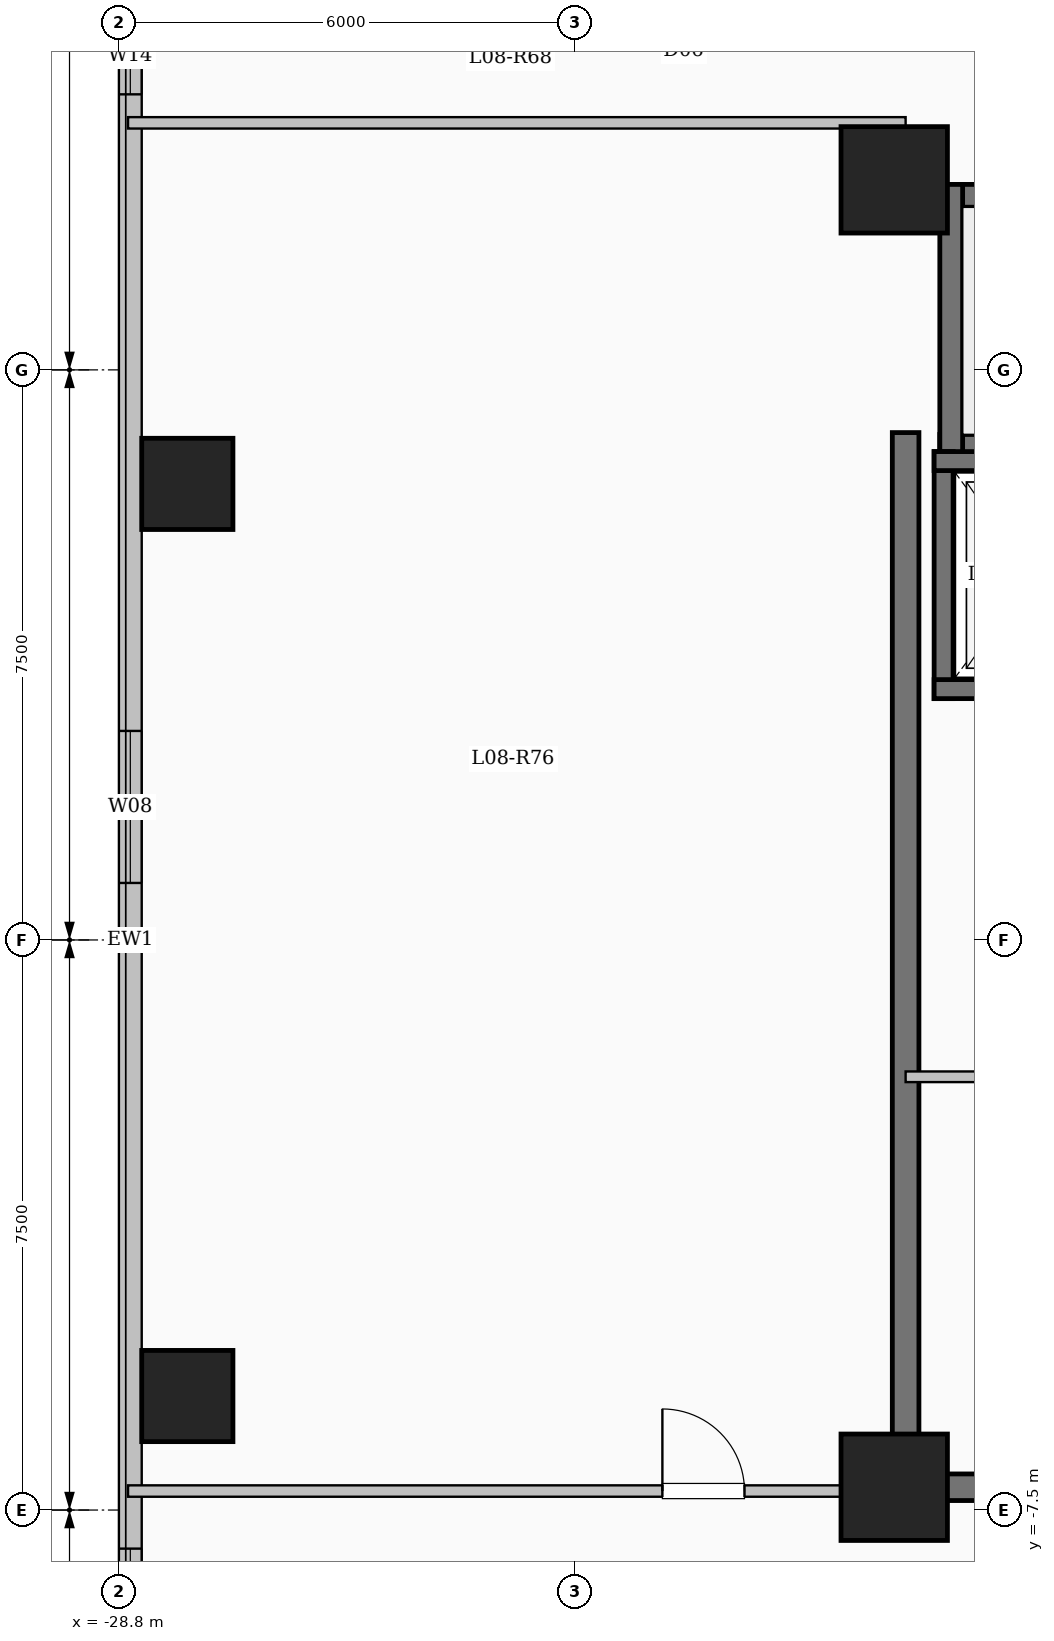
"""IFC4 building model, lengths in metres.
Left out: names, types, materials, properties, quantities, classifications, styles, units other than length and angle.
Written with IfcOpenShell. Run it as: python <this file> out.ifc"""

import sys

from ifc_helpers import new_model, si_unit, direction, frame, frame_2d, origin, origin_2d, place, context, subcontext, project, spatial, rectangle, extrude, element, fill, save


model = new_model("IFC4")
c1 = context("Model", 3, precision=1e-05, world=origin(), true_north=direction((0.0, 1.0)))
c2 = subcontext(c1, "Body", "Model", "MODEL_VIEW")
j1 = project(units=[si_unit("LENGTHUNIT", "METRE"), si_unit("PLANEANGLEUNIT", "RADIAN")], contexts=[c1])
p1 = place(None, origin())
s1 = spatial("IfcSite", under=j1, at=p1, CompositionType="ELEMENT")
p2 = place(p1, origin())
s2 = spatial("IfcBuilding", under=s1, at=p2, CompositionType="ELEMENT")
p3 = place(p2, frame((0.0, 0.0, 34.05)))
s3 = spatial("IfcBuildingStorey", under=s2, at=p3, CompositionType="ELEMENT", Elevation=34.05)
for number, where, z_axis, x_axis in (
    (1, (-18.6, -7.2, 0.0), (0.0, 0.0, 1.0), (1.0, 0.0, 0.0)),
    (2, (-18.6, 10.0, 0.0), (0.0, 0.0, 1.0), (1.0, 0.0, 0.0)),
):
    element("IfcColumn", number, at=place(p3, frame(where, z_axis=z_axis, x_axis=x_axis)), inside=s3, PredefinedType="COLUMN", context=c2, shape_type="SweptSolid", body=[
        extrude(rectangle(XDim=1.4, YDim=1.4, at=origin_2d()), origin(), (0.0, 0.0, 1.0), 3.35),
    ])
for number, where, z_axis, x_axis in (
    (3, (-27.9, -6.0, 0.0), (0.0, 0.0, 1.0), (1.0, 0.0, 0.0)),
    (4, (-27.9, 6.0, 0.0), (0.0, 0.0, 1.0), (1.0, 0.0, 0.0)),
):
    element("IfcColumn", number, at=place(p3, frame(where, z_axis=z_axis, x_axis=x_axis)), inside=s3, PredefinedType="COLUMN", context=c2, shape_type="SweptSolid", body=[
        extrude(rectangle(XDim=1.2, YDim=1.2, at=origin_2d()), origin(), (0.0, 0.0, 1.0), 3.35),
    ])
p4 = place(p3, frame((-28.65, -19.05, 0.0), z_axis=(0.0, 0.0, 1.0), x_axis=(0.0, 1.0, 0.0)))
e5 = element("IfcWall", 5, at=p4, inside=s3, PredefinedType="SOLIDWALL", context=c2, shape_type="SweptSolid", body=[
    extrude(rectangle(XDim=38.1, YDim=0.3, at=frame_2d((19.05, 0.0))), origin(), (0.0, 0.0, 1.0), 3.1),
])
p5 = place(p4, frame((3.15, 0.0, 0.9)))
e6 = element("IfcOpeningElement", 6, at=p5, cuts=e5, PredefinedType="OPENING", context=c2, shape_type="SweptSolid", body=[
    extrude(rectangle(XDim=2.4, YDim=1.8, at=frame_2d((1.2, 0.9))), frame((0.0, 0.16, 0.0), z_axis=(0.0, -1.0, 0.0), x_axis=(1.0, 0.0, 0.0)), (0.0, 0.0, 1.0), 0.32),
])
p6 = place(p4, frame((9.542, 0.0, 0.9)))
e7 = element("IfcOpeningElement", 7, at=p6, cuts=e5, PredefinedType="OPENING", context=c2, shape_type="SweptSolid", body=[
    extrude(rectangle(XDim=1.5, YDim=1.65, at=frame_2d((0.75, 0.825))), frame((0.0, 0.16, 0.0), z_axis=(0.0, -1.0, 0.0), x_axis=(1.0, 0.0, 0.0)), (0.0, 0.0, 1.0), 0.32),
])
p7 = place(p4, frame((19.8, 0.0, 0.9)))
e8 = element("IfcOpeningElement", 8, at=p7, cuts=e5, PredefinedType="OPENING", context=c2, shape_type="SweptSolid", body=[
    extrude(rectangle(XDim=2.0, YDim=1.7, at=frame_2d((1.0, 0.85))), frame((0.0, 0.16, 0.0), z_axis=(0.0, -1.0, 0.0), x_axis=(1.0, 0.0, 0.0)), (0.0, 0.0, 1.0), 0.32),
])
p8 = place(p4, frame((30.175, 0.0, 0.95)))
e9 = element("IfcOpeningElement", 9, at=p8, cuts=e5, PredefinedType="OPENING", context=c2, shape_type="SweptSolid", body=[
    extrude(rectangle(XDim=1.0, YDim=1.5, at=frame_2d((0.5, 0.75))), frame((0.0, 0.16, 0.0), z_axis=(0.0, -1.0, 0.0), x_axis=(1.0, 0.0, 0.0)), (0.0, 0.0, 1.0), 0.32),
])
p9 = place(p4, frame((33.85, 0.0, 0.9)))
e10 = element("IfcOpeningElement", 10, at=p9, cuts=e5, PredefinedType="OPENING", context=c2, shape_type="SweptSolid", body=[
    extrude(rectangle(XDim=2.0, YDim=1.7, at=frame_2d((1.0, 0.85))), frame((0.0, 0.16, 0.0), z_axis=(0.0, -1.0, 0.0), x_axis=(1.0, 0.0, 0.0)), (0.0, 0.0, 1.0), 0.32),
])
p10 = place(p3, frame((-18.0, 9.79, 0.0), z_axis=(0.0, 0.0, 1.0), x_axis=(1.0, 0.0, 0.0)))
e11 = element("IfcWall", 11, at=p10, inside=s3, PredefinedType="SHEAR", context=c2, shape_type="SweptSolid", body=[
    extrude(rectangle(XDim=8.0, YDim=0.3, at=frame_2d((4.0, 0.0))), origin(), (0.0, 0.0, 1.0), 3.35),
])
p11 = place(p3, frame((-18.0, 6.5, 0.0), z_axis=(0.0, 0.0, 1.0), x_axis=(1.0, 0.0, 0.0)))
e12 = element("IfcWall", 12, at=p11, inside=s3, PredefinedType="SHEAR", context=c2, shape_type="SweptSolid", body=[
    extrude(rectangle(XDim=8.0, YDim=0.3, at=frame_2d((4.0, 0.0))), origin(), (0.0, 0.0, 1.0), 3.35),
])
p12 = place(p11, frame((6.45, 0.0, 0.0)))
e13 = element("IfcOpeningElement", 13, at=p12, cuts=e12, PredefinedType="OPENING", context=c2, shape_type="SweptSolid", body=[
    extrude(rectangle(XDim=1.0, YDim=2.15, at=frame_2d((0.5, 1.075))), frame((0.0, 0.16, 0.0), z_axis=(0.0, -1.0, 0.0), x_axis=(1.0, 0.0, 0.0)), (0.0, 0.0, 1.0), 0.32),
])
p13 = place(p3, frame((-17.85, 6.35, 0.0), z_axis=(0.0, 0.0, 1.0), x_axis=(0.0, 1.0, 0.0)))
e14 = element("IfcWall", 14, at=p13, inside=s3, PredefinedType="SHEAR", context=c2, shape_type="SweptSolid", body=[
    extrude(rectangle(XDim=3.59, YDim=0.3, at=frame_2d((1.795, 0.0))), origin(), (0.0, 0.0, 1.0), 3.35),
])
p14 = place(p3, frame((-17.95, 3.175, 0.0), z_axis=(0.0, 0.0, 1.0), x_axis=(0.0, 1.0, 0.0)))
e15 = element("IfcWall", 15, at=p14, inside=s3, PredefinedType="SHEAR", context=c2, shape_type="SweptSolid", body=[
    extrude(rectangle(XDim=3.25, YDim=0.25, at=frame_2d((1.625, 0.0))), origin(), (0.0, 0.0, 1.0), 3.35),
])
for number, where, z_axis, x_axis in (
    (16, (-18.075, 3.3, 0.0), (0.0, 0.0, 1.0), (1.0, 0.0, 0.0)),
    (17, (-18.075, 6.3, 0.0), (0.0, 0.0, 1.0), (1.0, 0.0, 0.0)),
):
    element("IfcWall", number, at=place(p3, frame(where, z_axis=z_axis, x_axis=x_axis)), inside=s3, PredefinedType="SHEAR", context=c2, shape_type="SweptSolid", body=[
        extrude(rectangle(XDim=2.55, YDim=0.25, at=frame_2d((1.275, 0.0))), origin(), (0.0, 0.0, 1.0), 3.35),
    ])
p15 = place(p3, frame((-18.45, -7.375, 0.0), z_axis=(0.0, 0.0, 1.0), x_axis=(0.0, 1.0, 0.0)))
e18 = element("IfcWall", 18, at=p15, inside=s3, PredefinedType="SHEAR", context=c2, shape_type="SweptSolid", body=[
    extrude(rectangle(XDim=14.05, YDim=0.35, at=frame_2d((7.025, 0.0))), origin(), (0.0, 0.0, 1.0), 3.35),
])
p16 = place(p3, frame((-18.625, -7.2, 0.0), z_axis=(0.0, 0.0, 1.0), x_axis=(1.0, 0.0, 0.0)))
e19 = element("IfcWall", 19, at=p16, inside=s3, PredefinedType="SHEAR", context=c2, shape_type="SweptSolid", body=[
    extrude(rectangle(XDim=8.55, YDim=0.35, at=frame_2d((4.275, 0.0))), origin(), (0.0, 0.0, 1.0), 3.35),
])
p17 = place(p3, frame((-18.45, -1.8, 0.0), z_axis=(0.0, 0.0, 1.0), x_axis=(1.0, 0.0, 0.0)))
e20 = element("IfcWall", 20, at=p17, inside=s3, PredefinedType="PARTITIONING", context=c2, shape_type="SweptSolid", body=[
    extrude(rectangle(XDim=3.05, YDim=0.14, at=frame_2d((1.525, 0.0))), origin(), (0.0, 0.0, 1.0), 3.1),
])
p18 = place(p17, frame((1.05, 0.0, 0.0)))
e21 = element("IfcOpeningElement", 21, at=p18, cuts=e20, PredefinedType="OPENING", context=c2, shape_type="SweptSolid", body=[
    extrude(rectangle(XDim=0.9, YDim=2.08, at=frame_2d((0.45, 1.04))), frame((0.0, 0.08, 0.0), z_axis=(0.0, -1.0, 0.0), x_axis=(1.0, 0.0, 0.0)), (0.0, 0.0, 1.0), 0.16),
])
p19 = place(p3, frame((-28.68, -7.25, 0.0), z_axis=(0.0, 0.0, 1.0), x_axis=(1.0, 0.0, 0.0)))
e22 = element("IfcWall", 22, at=p19, inside=s3, PredefinedType="PARTITIONING", context=c2, shape_type="SweptSolid", body=[
    extrude(rectangle(XDim=10.23, YDim=0.15, at=frame_2d((5.115, 0.0))), origin(), (0.0, 0.0, 1.0), 3.1),
])
p20 = place(p19, frame((7.03, 0.0, 0.0)))
e23 = element("IfcOpeningElement", 23, at=p20, cuts=e22, PredefinedType="OPENING", context=c2, shape_type="SweptSolid", body=[
    extrude(rectangle(XDim=1.08, YDim=2.15, at=frame_2d((0.54, 1.075))), frame((0.0, 0.085, 0.0), z_axis=(0.0, -1.0, 0.0), x_axis=(1.0, 0.0, 0.0)), (0.0, 0.0, 1.0), 0.17),
])
p21 = place(p3, frame((-28.68, 10.75, 0.0), z_axis=(0.0, 0.0, 1.0), x_axis=(1.0, 0.0, 0.0)))
e24 = element("IfcWall", 24, at=p21, inside=s3, PredefinedType="PARTITIONING", context=c2, shape_type="SweptSolid", body=[
    extrude(rectangle(XDim=10.23, YDim=0.15, at=frame_2d((5.115, 0.0))), origin(), (0.0, 0.0, 1.0), 3.1),
])
p22 = place(p6, origin())
e25 = element("IfcWindow", 25, at=p22, inside=s3, PartitioningType="SINGLE_PANEL", PredefinedType="WINDOW", context=c2, shape_type="SweptSolid", body=[
    extrude(rectangle(XDim=1.5, YDim=1.65, at=frame_2d((0.75, 0.825))), frame((0.0, 0.03, 0.0), z_axis=(0.0, -1.0, 0.0), x_axis=(1.0, 0.0, 0.0)), (0.0, 0.0, 1.0), 0.06),
])
fill(e7, e25)
p23 = place(p7, origin())
e26 = element("IfcWindow", 26, at=p23, inside=s3, PartitioningType="SINGLE_PANEL", PredefinedType="WINDOW", context=c2, shape_type="SweptSolid", body=[
    extrude(rectangle(XDim=2.0, YDim=1.7, at=frame_2d((1.0, 0.85))), frame((0.0, 0.03, 0.0), z_axis=(0.0, -1.0, 0.0), x_axis=(1.0, 0.0, 0.0)), (0.0, 0.0, 1.0), 0.06),
])
fill(e8, e26)
p24 = place(p8, origin())
e27 = element("IfcWindow", 27, at=p24, inside=s3, PartitioningType="SINGLE_PANEL", PredefinedType="WINDOW", context=c2, shape_type="SweptSolid", body=[
    extrude(rectangle(XDim=1.0, YDim=1.5, at=frame_2d((0.5, 0.75))), frame((0.0, 0.03, 0.0), z_axis=(0.0, -1.0, 0.0), x_axis=(1.0, 0.0, 0.0)), (0.0, 0.0, 1.0), 0.06),
])
fill(e9, e27)
p25 = place(p20, origin())
e28 = element("IfcDoor", 28, at=p25, inside=s3, OperationType="SINGLE_SWING_LEFT", PredefinedType="DOOR", context=c2, shape_type="SweptSolid", body=[
    extrude(rectangle(XDim=1.08, YDim=2.15, at=frame_2d((0.54, 1.075))), frame((0.0, 0.025, 0.0), z_axis=(0.0, -1.0, 0.0), x_axis=(1.0, 0.0, 0.0)), (0.0, 0.0, 1.0), 0.05),
])
fill(e23, e28)
save(model, sys.argv[1])
